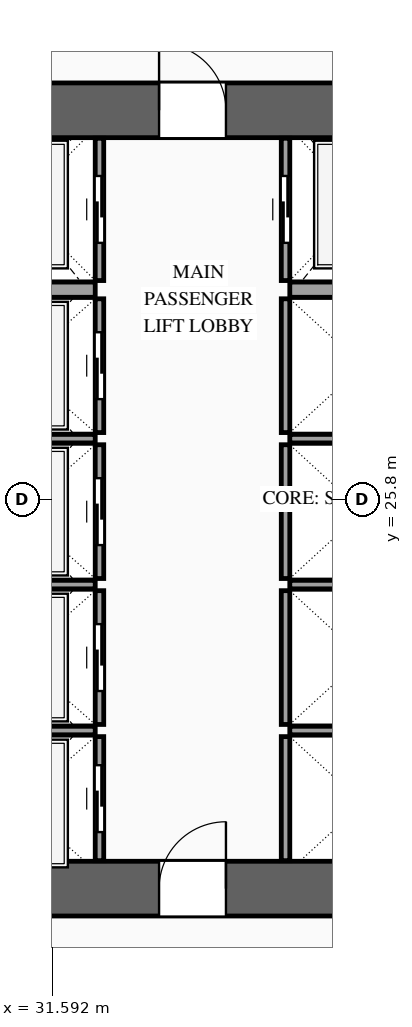
"""IFC4 building model, lengths in metres.
Left out: names, types, materials, properties, quantities, classifications, styles, units other than length and angle.
Written with IfcOpenShell. Run it as: python <this file> out.ifc"""

import sys

from ifc_helpers import new_model, si_unit, direction, frame, frame_2d, origin, place, context, subcontext, project, spatial, rectangle, extrude, source, transform, mapped, element, fill, save


model = new_model("IFC4")
c1 = context("Model", 3, precision=1e-05, world=origin(), true_north=direction((0.0, 1.0)))
c2 = subcontext(c1, "Body", "Model", "MODEL_VIEW")
j1 = project(units=[si_unit("LENGTHUNIT", "METRE"), si_unit("PLANEANGLEUNIT", "RADIAN")], contexts=[c1])
p1 = place(None, origin())
s1 = spatial("IfcSite", under=j1, at=p1, CompositionType="ELEMENT")
p2 = place(p1, origin())
s2 = spatial("IfcBuilding", under=s1, at=p2, CompositionType="ELEMENT")
p3 = place(p2, frame((0.0, 0.0, 5.4)))
s3 = spatial("IfcBuildingStorey", under=s2, at=p3, CompositionType="ELEMENT", Elevation=5.4)
p4 = place(p3, frame((23.35, 19.4, 0.0), z_axis=(0.0, 0.0, 1.0), x_axis=(1.0, 0.0, 0.0)))
e1 = element("IfcWall", 1, at=p4, inside=s3, PredefinedType="SHEAR", context=c2, shape_type="SweptSolid", body=[
    extrude(rectangle(XDim=27.3, YDim=0.9, at=frame_2d((13.65, 0.0))), origin(), (0.0, 0.0, 1.0), 4.8),
])
p5 = place(p4, frame((2.1, 0.0, 0.0)))
e2 = element("IfcOpeningElement", 2, at=p5, cuts=e1, PredefinedType="OPENING", context=c2, shape_type="SweptSolid", body=[
    extrude(rectangle(XDim=1.1, YDim=2.2, at=frame_2d((0.55, 1.1))), frame((0.0, 0.465, 0.0), z_axis=(0.0, -1.0, 0.0), x_axis=(1.0, 0.0, 0.0)), (0.0, 0.0, 1.0), 0.93),
])
p6 = place(p4, frame((10.0, 0.0, 0.0)))
e3 = element("IfcOpeningElement", 3, at=p6, cuts=e1, PredefinedType="OPENING", context=c2, shape_type="SweptSolid", body=[
    extrude(rectangle(XDim=1.1, YDim=2.2, at=frame_2d((0.55, 1.1))), frame((0.0, 0.465, 0.0), z_axis=(0.0, -1.0, 0.0), x_axis=(1.0, 0.0, 0.0)), (0.0, 0.0, 1.0), 0.93),
])
p7 = place(p4, frame((23.2, 0.0, 0.0)))
e4 = element("IfcOpeningElement", 4, at=p7, cuts=e1, PredefinedType="OPENING", context=c2, shape_type="SweptSolid", body=[
    extrude(rectangle(XDim=1.1, YDim=2.2, at=frame_2d((0.55, 1.1))), frame((0.0, 0.465, 0.0), z_axis=(0.0, -1.0, 0.0), x_axis=(1.0, 0.0, 0.0)), (0.0, 0.0, 1.0), 0.93),
])
p8 = place(p4, frame((19.82, 0.0, 0.0)))
e5 = element("IfcOpeningElement", 5, at=p8, cuts=e1, PredefinedType="OPENING", context=c2, shape_type="SweptSolid", body=[
    extrude(rectangle(XDim=0.9, YDim=2.15, at=frame_2d((0.45, 1.075))), frame((0.0, 0.465, 0.0), z_axis=(0.0, -1.0, 0.0), x_axis=(1.0, 0.0, 0.0)), (0.0, 0.0, 1.0), 0.93),
])
p9 = place(p4, frame((18.38, 0.0, 0.0)))
e6 = element("IfcOpeningElement", 6, at=p9, cuts=e1, PredefinedType="OPENING", context=c2, shape_type="SweptSolid", body=[
    extrude(rectangle(XDim=0.9, YDim=2.15, at=frame_2d((0.45, 1.075))), frame((0.0, 0.465, 0.0), z_axis=(0.0, -1.0, 0.0), x_axis=(1.0, 0.0, 0.0)), (0.0, 0.0, 1.0), 0.93),
])
p10 = place(p3, frame((23.35, 32.2, 0.0), z_axis=(0.0, 0.0, 1.0), x_axis=(1.0, 0.0, 0.0)))
e7 = element("IfcWall", 7, at=p10, inside=s3, PredefinedType="SHEAR", context=c2, shape_type="SweptSolid", body=[
    extrude(rectangle(XDim=27.3, YDim=0.9, at=frame_2d((13.65, 0.0))), origin(), (0.0, 0.0, 1.0), 4.8),
])
p11 = place(p10, frame((4.72, 0.0, 0.0)))
e8 = element("IfcOpeningElement", 8, at=p11, cuts=e7, PredefinedType="OPENING", context=c2, shape_type="SweptSolid", body=[
    extrude(rectangle(XDim=0.9, YDim=2.15, at=frame_2d((0.45, 1.075))), frame((0.0, 0.465, 0.0), z_axis=(0.0, -1.0, 0.0), x_axis=(1.0, 0.0, 0.0)), (0.0, 0.0, 1.0), 0.93),
])
p12 = place(p10, frame((10.0, 0.0, 0.0)))
e9 = element("IfcOpeningElement", 9, at=p12, cuts=e7, PredefinedType="OPENING", context=c2, shape_type="SweptSolid", body=[
    extrude(rectangle(XDim=1.1, YDim=2.2, at=frame_2d((0.55, 1.1))), frame((0.0, 0.465, 0.0), z_axis=(0.0, -1.0, 0.0), x_axis=(1.0, 0.0, 0.0)), (0.0, 0.0, 1.0), 0.93),
])
p13 = place(p10, frame((15.85, 0.0, 0.0)))
e10 = element("IfcOpeningElement", 10, at=p13, cuts=e7, PredefinedType="OPENING", context=c2, shape_type="SweptSolid", body=[
    extrude(rectangle(XDim=1.1, YDim=2.2, at=frame_2d((0.55, 1.1))), frame((0.0, 0.465, 0.0), z_axis=(0.0, -1.0, 0.0), x_axis=(1.0, 0.0, 0.0)), (0.0, 0.0, 1.0), 0.93),
])
p14 = place(p10, frame((18.38, 0.0, 0.0)))
e11 = element("IfcOpeningElement", 11, at=p14, cuts=e7, PredefinedType="OPENING", context=c2, shape_type="SweptSolid", body=[
    extrude(rectangle(XDim=0.9, YDim=2.15, at=frame_2d((0.45, 1.075))), frame((0.0, 0.465, 0.0), z_axis=(0.0, -1.0, 0.0), x_axis=(1.0, 0.0, 0.0)), (0.0, 0.0, 1.0), 0.93),
])
p15 = place(p10, frame((19.82, 0.0, 0.0)))
e12 = element("IfcOpeningElement", 12, at=p15, cuts=e7, PredefinedType="OPENING", context=c2, shape_type="SweptSolid", body=[
    extrude(rectangle(XDim=0.9, YDim=2.15, at=frame_2d((0.45, 1.075))), frame((0.0, 0.465, 0.0), z_axis=(0.0, -1.0, 0.0), x_axis=(1.0, 0.0, 0.0)), (0.0, 0.0, 1.0), 0.93),
])
p16 = place(p3, frame((32.37, 19.86, 0.0), z_axis=(0.0, 0.0, 1.0), x_axis=(0.0, 1.0, 0.0)))
e13 = element("IfcWall", 13, at=p16, inside=s3, PredefinedType="SOLIDWALL", context=c2, shape_type="SweptSolid", body=[
    extrude(rectangle(XDim=2.04, YDim=0.14, at=frame_2d((1.02, 0.0))), origin(), (0.0, 0.0, 1.0), 4.52),
])
p17 = place(p16, frame((0.47, 0.0, 0.0)))
e14 = element("IfcOpeningElement", 14, at=p17, cuts=e13, PredefinedType="OPENING", context=c2, shape_type="SweptSolid", body=[
    extrude(rectangle(XDim=1.1, YDim=2.2, at=frame_2d((0.55, 1.1))), frame((0.0, 0.085, 0.0), z_axis=(0.0, -1.0, 0.0), x_axis=(1.0, 0.0, 0.0)), (0.0, 0.0, 1.0), 0.17),
])
m1 = source(origin(), c2, "Body", "SweptSolid", [
    extrude(rectangle(XDim=2.5, YDim=0.14, at=frame_2d((1.25, 0.0))), origin(), (0.0, 0.0, 1.0), 4.52),
])
p18 = place(p3, frame((29.8, 22.0, 0.0), z_axis=(0.0, 0.0, 1.0), x_axis=(1.0, 0.0, 0.0)))
e15 = element("IfcWall", 15, at=p18, inside=s3, PredefinedType="SOLIDWALL", context=c2, shape_type="MappedRepresentation", body=[
    mapped(m1, transform((0.0, 0.0, 0.0), scale=1.0)),
])
p19 = place(p3, frame((32.37, 22.1, 0.0), z_axis=(0.0, 0.0, 1.0), x_axis=(0.0, 1.0, 0.0)))
e16 = element("IfcWall", 16, at=p19, inside=s3, PredefinedType="SOLIDWALL", context=c2, shape_type="SweptSolid", body=[
    extrude(rectangle(XDim=2.2, YDim=0.14, at=frame_2d((1.1, 0.0))), origin(), (0.0, 0.0, 1.0), 4.52),
])
p20 = place(p19, frame((0.55, 0.0, 0.0)))
e17 = element("IfcOpeningElement", 17, at=p20, cuts=e16, PredefinedType="OPENING", context=c2, shape_type="SweptSolid", body=[
    extrude(rectangle(XDim=1.1, YDim=2.2, at=frame_2d((0.55, 1.1))), frame((0.0, 0.085, 0.0), z_axis=(0.0, -1.0, 0.0), x_axis=(1.0, 0.0, 0.0)), (0.0, 0.0, 1.0), 0.17),
])
p21 = place(p3, frame((29.8, 24.4, 0.0), z_axis=(0.0, 0.0, 1.0), x_axis=(1.0, 0.0, 0.0)))
e18 = element("IfcWall", 18, at=p21, inside=s3, PredefinedType="SOLIDWALL", context=c2, shape_type="MappedRepresentation", body=[
    mapped(m1, transform((0.0, 0.0, 0.0), scale=1.0)),
])
p22 = place(p3, frame((32.37, 24.5, 0.0), z_axis=(0.0, 0.0, 1.0), x_axis=(0.0, 1.0, 0.0)))
e19 = element("IfcWall", 19, at=p22, inside=s3, PredefinedType="SOLIDWALL", context=c2, shape_type="SweptSolid", body=[
    extrude(rectangle(XDim=2.2, YDim=0.14, at=frame_2d((1.1, 0.0))), origin(), (0.0, 0.0, 1.0), 4.52),
])
p23 = place(p22, frame((0.55, 0.0, 0.0)))
e20 = element("IfcOpeningElement", 20, at=p23, cuts=e19, PredefinedType="OPENING", context=c2, shape_type="SweptSolid", body=[
    extrude(rectangle(XDim=1.1, YDim=2.2, at=frame_2d((0.55, 1.1))), frame((0.0, 0.085, 0.0), z_axis=(0.0, -1.0, 0.0), x_axis=(1.0, 0.0, 0.0)), (0.0, 0.0, 1.0), 0.17),
])
p24 = place(p3, frame((29.8, 26.8, 0.0), z_axis=(0.0, 0.0, 1.0), x_axis=(1.0, 0.0, 0.0)))
e21 = element("IfcWall", 21, at=p24, inside=s3, PredefinedType="SOLIDWALL", context=c2, shape_type="MappedRepresentation", body=[
    mapped(m1, transform((0.0, 0.0, 0.0), scale=1.0)),
])
p25 = place(p3, frame((32.37, 26.9, 0.0), z_axis=(0.0, 0.0, 1.0), x_axis=(0.0, 1.0, 0.0)))
e22 = element("IfcWall", 22, at=p25, inside=s3, PredefinedType="SOLIDWALL", context=c2, shape_type="SweptSolid", body=[
    extrude(rectangle(XDim=2.2, YDim=0.14, at=frame_2d((1.1, 0.0))), origin(), (0.0, 0.0, 1.0), 4.52),
])
p26 = place(p25, frame((0.55, 0.0, 0.0)))
e23 = element("IfcOpeningElement", 23, at=p26, cuts=e22, PredefinedType="OPENING", context=c2, shape_type="SweptSolid", body=[
    extrude(rectangle(XDim=1.1, YDim=2.2, at=frame_2d((0.55, 1.1))), frame((0.0, 0.085, 0.0), z_axis=(0.0, -1.0, 0.0), x_axis=(1.0, 0.0, 0.0)), (0.0, 0.0, 1.0), 0.17),
])
p27 = place(p3, frame((32.37, 29.4, 0.0), z_axis=(0.0, 0.0, 1.0), x_axis=(0.0, 1.0, 0.0)))
e24 = element("IfcWall", 24, at=p27, inside=s3, PredefinedType="SOLIDWALL", context=c2, shape_type="SweptSolid", body=[
    extrude(rectangle(XDim=2.34, YDim=0.14, at=frame_2d((1.17, 0.0))), origin(), (0.0, 0.0, 1.0), 4.52),
])
p28 = place(p27, frame((0.62, 0.0, 0.0)))
e25 = element("IfcOpeningElement", 25, at=p28, cuts=e24, PredefinedType="OPENING", context=c2, shape_type="SweptSolid", body=[
    extrude(rectangle(XDim=1.1, YDim=2.2, at=frame_2d((0.55, 1.1))), frame((0.0, 0.085, 0.0), z_axis=(0.0, -1.0, 0.0), x_axis=(1.0, 0.0, 0.0)), (0.0, 0.0, 1.0), 0.17),
])
m2 = source(origin(), c2, "Body", "SweptSolid", [
    extrude(rectangle(XDim=2.5, YDim=0.25, at=frame_2d((1.25, 0.0))), origin(), (0.0, 0.0, 1.0), 4.52),
])
p29 = place(p3, frame((29.8, 29.25, 0.0), z_axis=(0.0, 0.0, 1.0), x_axis=(1.0, 0.0, 0.0)))
e26 = element("IfcWall", 26, at=p29, inside=s3, PredefinedType="SOLIDWALL", context=c2, shape_type="MappedRepresentation", body=[
    mapped(m2, transform((0.0, 0.0, 0.0), scale=1.0)),
])
m3 = source(origin(), c2, "Body", "SweptSolid", [
    extrude(rectangle(XDim=2.04, YDim=0.14, at=frame_2d((1.02, 0.0))), origin(), (0.0, 0.0, 1.0), 4.52),
])
p30 = place(p3, frame((35.43, 19.86, 0.0), z_axis=(0.0, 0.0, 1.0), x_axis=(0.0, 1.0, 0.0)))
e27 = element("IfcWall", 27, at=p30, inside=s3, PredefinedType="SOLIDWALL", context=c2, shape_type="MappedRepresentation", body=[
    mapped(m3, transform((0.0, 0.0, 0.0), scale=1.0)),
])
m4 = source(origin(), c2, "Body", "SweptSolid", [
    extrude(rectangle(XDim=2.4, YDim=0.14, at=frame_2d((1.2, 0.0))), origin(), (0.0, 0.0, 1.0), 4.52),
])
p31 = place(p3, frame((35.5, 22.0, 0.0), z_axis=(0.0, 0.0, 1.0), x_axis=(1.0, 0.0, 0.0)))
e28 = element("IfcWall", 28, at=p31, inside=s3, PredefinedType="SOLIDWALL", context=c2, shape_type="MappedRepresentation", body=[
    mapped(m4, transform((0.0, 0.0, 0.0), scale=1.0)),
])
m5 = source(origin(), c2, "Body", "SweptSolid", [
    extrude(rectangle(XDim=2.2, YDim=0.14, at=frame_2d((1.1, 0.0))), origin(), (0.0, 0.0, 1.0), 4.52),
])
p32 = place(p3, frame((35.43, 22.1, 0.0), z_axis=(0.0, 0.0, 1.0), x_axis=(0.0, 1.0, 0.0)))
e29 = element("IfcWall", 29, at=p32, inside=s3, PredefinedType="SOLIDWALL", context=c2, shape_type="MappedRepresentation", body=[
    mapped(m5, transform((0.0, 0.0, 0.0), scale=1.0)),
])
p33 = place(p3, frame((35.5, 24.4, 0.0), z_axis=(0.0, 0.0, 1.0), x_axis=(1.0, 0.0, 0.0)))
e30 = element("IfcWall", 30, at=p33, inside=s3, PredefinedType="SOLIDWALL", context=c2, shape_type="MappedRepresentation", body=[
    mapped(m4, transform((0.0, 0.0, 0.0), scale=1.0)),
])
p34 = place(p3, frame((35.43, 24.5, 0.0), z_axis=(0.0, 0.0, 1.0), x_axis=(0.0, 1.0, 0.0)))
e31 = element("IfcWall", 31, at=p34, inside=s3, PredefinedType="SOLIDWALL", context=c2, shape_type="MappedRepresentation", body=[
    mapped(m5, transform((0.0, 0.0, 0.0), scale=1.0)),
])
p35 = place(p3, frame((35.5, 26.8, 0.0), z_axis=(0.0, 0.0, 1.0), x_axis=(1.0, 0.0, 0.0)))
e32 = element("IfcWall", 32, at=p35, inside=s3, PredefinedType="SOLIDWALL", context=c2, shape_type="MappedRepresentation", body=[
    mapped(m4, transform((0.0, 0.0, 0.0), scale=1.0)),
])
m6 = source(origin(), c2, "Body", "SweptSolid", [
    extrude(rectangle(XDim=2.2, YDim=0.14, at=frame_2d((1.1, 0.0))), origin(), (0.0, 0.0, 1.0), 4.52),
])
p36 = place(p3, frame((35.43, 26.9, 0.0), z_axis=(0.0, 0.0, 1.0), x_axis=(0.0, 1.0, 0.0)))
e33 = element("IfcWall", 33, at=p36, inside=s3, PredefinedType="SOLIDWALL", context=c2, shape_type="MappedRepresentation", body=[
    mapped(m6, transform((0.0, 0.0, 0.0), scale=1.0)),
])
p37 = place(p3, frame((35.43, 29.4, 0.0), z_axis=(0.0, 0.0, 1.0), x_axis=(0.0, 1.0, 0.0)))
e34 = element("IfcWall", 34, at=p37, inside=s3, PredefinedType="SOLIDWALL", context=c2, shape_type="SweptSolid", body=[
    extrude(rectangle(XDim=2.34, YDim=0.14, at=frame_2d((1.17, 0.0))), origin(), (0.0, 0.0, 1.0), 4.52),
])
p38 = place(p37, frame((0.62, 0.0, 0.0)))
e35 = element("IfcOpeningElement", 35, at=p38, cuts=e34, PredefinedType="OPENING", context=c2, shape_type="SweptSolid", body=[
    extrude(rectangle(XDim=1.1, YDim=2.2, at=frame_2d((0.55, 1.1))), frame((0.0, 0.085, 0.0), z_axis=(0.0, -1.0, 0.0), x_axis=(1.0, 0.0, 0.0)), (0.0, 0.0, 1.0), 0.17),
])
m7 = source(origin(), c2, "Body", "SweptSolid", [
    extrude(rectangle(XDim=2.4, YDim=0.25, at=frame_2d((1.2, 0.0))), origin(), (0.0, 0.0, 1.0), 4.52),
])
p39 = place(p3, frame((35.5, 29.25, 0.0), z_axis=(0.0, 0.0, 1.0), x_axis=(1.0, 0.0, 0.0)))
e36 = element("IfcWall", 36, at=p39, inside=s3, PredefinedType="SOLIDWALL", context=c2, shape_type="MappedRepresentation", body=[
    mapped(m7, transform((0.0, 0.0, 0.0), scale=1.0)),
])
m8 = source(origin(), c2, "Body", "SweptSolid", [
    extrude(rectangle(XDim=1.1, YDim=2.2, at=frame_2d((0.55, 1.1))), frame((0.0, 0.025, 0.0), z_axis=(0.0, -1.0, 0.0), x_axis=(1.0, 0.0, 0.0)), (0.0, 0.0, 1.0), 0.05),
])
p40 = place(p17, origin())
e37 = element("IfcDoor", 37, at=p40, inside=s3, OperationType="SLIDING_TO_LEFT", PredefinedType="DOOR", context=c2, shape_type="MappedRepresentation", body=[
    mapped(m8, transform((0.0, 0.0, 0.0), scale=1.0)),
])
fill(e14, e37)
p41 = place(p20, origin())
e38 = element("IfcDoor", 38, at=p41, inside=s3, OperationType="SLIDING_TO_RIGHT", PredefinedType="DOOR", context=c2, shape_type="MappedRepresentation", body=[
    mapped(m8, transform((0.0, 0.0, 0.0), scale=1.0)),
])
fill(e17, e38)
p42 = place(p23, origin())
e39 = element("IfcDoor", 39, at=p42, inside=s3, OperationType="SLIDING_TO_LEFT", PredefinedType="DOOR", context=c2, shape_type="MappedRepresentation", body=[
    mapped(m8, transform((0.0, 0.0, 0.0), scale=1.0)),
])
fill(e20, e39)
p43 = place(p26, origin())
e40 = element("IfcDoor", 40, at=p43, inside=s3, OperationType="SLIDING_TO_RIGHT", PredefinedType="DOOR", context=c2, shape_type="MappedRepresentation", body=[
    mapped(m8, transform((0.0, 0.0, 0.0), scale=1.0)),
])
fill(e23, e40)
p44 = place(p28, origin())
e41 = element("IfcDoor", 41, at=p44, inside=s3, OperationType="SLIDING_TO_LEFT", PredefinedType="DOOR", context=c2, shape_type="MappedRepresentation", body=[
    mapped(m8, transform((0.0, 0.0, 0.0), scale=1.0)),
])
fill(e25, e41)
p45 = place(p38, origin())
e42 = element("IfcDoor", 42, at=p45, inside=s3, OperationType="SLIDING_TO_RIGHT", PredefinedType="DOOR", context=c2, shape_type="MappedRepresentation", body=[
    mapped(m8, transform((0.0, 0.0, 0.0), scale=1.0)),
])
fill(e35, e42)
m9 = source(origin(), c2, "Body", "SweptSolid", [
    extrude(rectangle(XDim=1.1, YDim=2.2, at=frame_2d((0.55, 1.1))), frame((0.0, 0.025, 0.0), z_axis=(0.0, -1.0, 0.0), x_axis=(1.0, 0.0, 0.0)), (0.0, 0.0, 1.0), 0.05),
])
p46 = place(p6, origin())
e43 = element("IfcDoor", 43, at=p46, inside=s3, OperationType="SINGLE_SWING_RIGHT", PredefinedType="DOOR", context=c2, shape_type="MappedRepresentation", body=[
    mapped(m9, transform((0.0, 0.0, 0.0), scale=1.0)),
])
fill(e3, e43)
p47 = place(p12, origin())
e44 = element("IfcDoor", 44, at=p47, inside=s3, OperationType="SINGLE_SWING_LEFT", PredefinedType="DOOR", context=c2, shape_type="MappedRepresentation", body=[
    mapped(m9, transform((0.0, 0.0, 0.0), scale=1.0)),
])
fill(e9, e44)
save(model, sys.argv[1])
